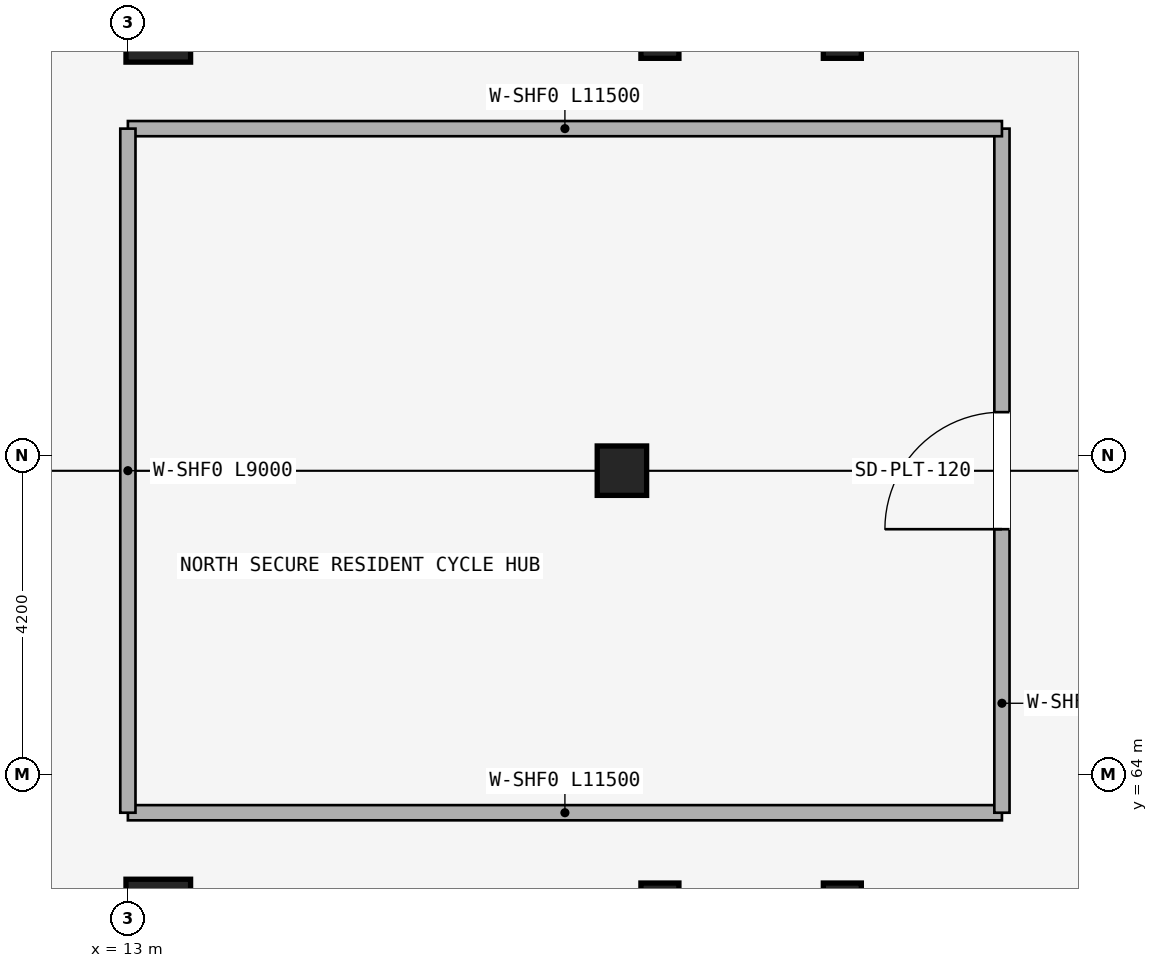
"""IFC4 building model, lengths in metres.
Left out: names, types, materials, properties, quantities, classifications, styles, units other than length and angle.
Written with IfcOpenShell. Run it as: python <this file> out.ifc"""

import sys

from ifc_helpers import new_model, si_unit, direction, frame, frame_2d, origin, origin_2d, place, context, subcontext, project, spatial, rectangle, extrude, element, fill, save


model = new_model("IFC4")
c1 = context("Model", 3, precision=1e-05, world=origin(), true_north=direction((0.0, 1.0)))
c2 = subcontext(c1, "Body", "Model", "MODEL_VIEW")
j1 = project(units=[si_unit("LENGTHUNIT", "METRE"), si_unit("PLANEANGLEUNIT", "RADIAN")], contexts=[c1])
p1 = place(None, origin())
s1 = spatial("IfcSite", under=j1, at=p1, CompositionType="ELEMENT")
p2 = place(p1, origin())
s2 = spatial("IfcBuilding", under=s1, at=p2, CompositionType="ELEMENT")
p3 = place(p2, frame((0.0, 0.0, -4.5)))
s3 = spatial("IfcBuildingStorey", under=s2, at=p3, CompositionType="ELEMENT", Elevation=-4.5)
p4 = place(p3, frame((19.5, 68.0, 0.0), z_axis=(0.0, 0.0, 1.0), x_axis=(1.0, 0.0, 0.0)))
e1 = element("IfcColumn", 1, at=p4, inside=s3, PredefinedType="COLUMN", context=c2, shape_type="SweptSolid", body=[
    extrude(rectangle(XDim=0.65, YDim=0.65, at=origin_2d()), origin(), (0.0, 0.0, 1.0), 4.2),
])
for number, where, z_axis, x_axis in (
    (2, (22.4, 73.8, -0.5), (0.0, 0.0, 1.0), (1.0, 0.0, 0.0)),
    (3, (20.0, 73.8, -0.5), (0.0, 0.0, 1.0), (1.0, 0.0, 0.0)),
):
    element("IfcColumn", number, at=place(p3, frame(where, z_axis=z_axis, x_axis=x_axis)), inside=s3, PredefinedType="COLUMN", context=c2, shape_type="SweptSolid", body=[
        extrude(rectangle(XDim=0.5, YDim=0.75, at=origin_2d()), origin(), (0.0, 0.0, 1.0), 4.78),
    ])
p5 = place(p3, frame((13.4, 73.8, -0.5), z_axis=(0.0, 0.0, 1.0), x_axis=(1.0, 0.0, 0.0)))
e4 = element("IfcColumn", 4, at=p5, inside=s3, PredefinedType="COLUMN", context=c2, shape_type="SweptSolid", body=[
    extrude(rectangle(XDim=0.85, YDim=0.85, at=origin_2d()), origin(), (0.0, 0.0, 1.0), 4.78),
])
for number, where, z_axis, x_axis in (
    (5, (22.4, 62.2, -0.5), (0.0, 0.0, 1.0), (1.0, 0.0, 0.0)),
    (6, (20.0, 62.2, -0.5), (0.0, 0.0, 1.0), (1.0, 0.0, 0.0)),
):
    element("IfcColumn", number, at=place(p3, frame(where, z_axis=z_axis, x_axis=x_axis)), inside=s3, PredefinedType="COLUMN", context=c2, shape_type="SweptSolid", body=[
        extrude(rectangle(XDim=0.5, YDim=0.75, at=origin_2d()), origin(), (0.0, 0.0, 1.0), 4.78),
    ])
p6 = place(p3, frame((13.4, 62.2, -0.5), z_axis=(0.0, 0.0, 1.0), x_axis=(1.0, 0.0, 0.0)))
e7 = element("IfcColumn", 7, at=p6, inside=s3, PredefinedType="COLUMN", context=c2, shape_type="SweptSolid", body=[
    extrude(rectangle(XDim=0.85, YDim=0.85, at=origin_2d()), origin(), (0.0, 0.0, 1.0), 4.78),
])
p7 = place(p3, frame((13.0, 63.5, 0.0), z_axis=(0.0, 0.0, 1.0), x_axis=(1.0, 0.0, 0.0)))
e8 = element("IfcWall", 8, at=p7, inside=s3, PredefinedType="STANDARD", context=c2, shape_type="SweptSolid", body=[
    extrude(rectangle(XDim=11.5, YDim=0.2, at=frame_2d((5.75, 0.0))), origin(), (0.0, 0.0, 1.0), 4.18),
])
p8 = place(p3, frame((24.5, 63.5, 0.0), z_axis=(0.0, 0.0, 1.0), x_axis=(0.0, 1.0, 0.0)))
e9 = element("IfcWall", 9, at=p8, inside=s3, PredefinedType="STANDARD", context=c2, shape_type="SweptSolid", body=[
    extrude(rectangle(XDim=9.0, YDim=0.2, at=frame_2d((4.5, 0.0))), origin(), (0.0, 0.0, 1.0), 4.18),
])
p9 = place(p8, frame((3.73, 0.0, 0.0)))
e10 = element("IfcOpeningElement", 10, at=p9, cuts=e9, PredefinedType="OPENING", context=c2, shape_type="SweptSolid", body=[
    extrude(rectangle(XDim=1.54, YDim=2.15, at=frame_2d((0.77, 1.075))), frame((0.0, 0.11, 0.0), z_axis=(0.0, -1.0, 0.0), x_axis=(1.0, 0.0, 0.0)), (0.0, 0.0, 1.0), 0.22),
])
p10 = place(p3, frame((24.5, 72.5, 0.0), z_axis=(0.0, 0.0, 1.0), x_axis=(-1.0, 0.0, 0.0)))
e11 = element("IfcWall", 11, at=p10, inside=s3, PredefinedType="STANDARD", context=c2, shape_type="SweptSolid", body=[
    extrude(rectangle(XDim=11.5, YDim=0.2, at=frame_2d((5.75, 0.0))), origin(), (0.0, 0.0, 1.0), 4.18),
])
p11 = place(p3, frame((13.0, 72.5, 0.0), z_axis=(0.0, 0.0, 1.0), x_axis=(0.0, -1.0, 0.0)))
e12 = element("IfcWall", 12, at=p11, inside=s3, PredefinedType="STANDARD", context=c2, shape_type="SweptSolid", body=[
    extrude(rectangle(XDim=9.0, YDim=0.2, at=frame_2d((4.5, 0.0))), origin(), (0.0, 0.0, 1.0), 4.18),
])
p12 = place(p9, frame((1.54, 0.0, 0.0), z_axis=(0.0, 0.0, 1.0), x_axis=(-1.0, 0.0, 0.0)))
e13 = element("IfcDoor", 13, at=p12, inside=s3, OperationType="SINGLE_SWING_RIGHT", PredefinedType="DOOR", context=c2, shape_type="SweptSolid", body=[
    extrude(rectangle(XDim=1.54, YDim=2.15, at=frame_2d((0.77, 1.075))), frame((0.0, 0.025, 0.0), z_axis=(0.0, -1.0, 0.0), x_axis=(1.0, 0.0, 0.0)), (0.0, 0.0, 1.0), 0.05),
])
fill(e10, e13)
save(model, sys.argv[1])
